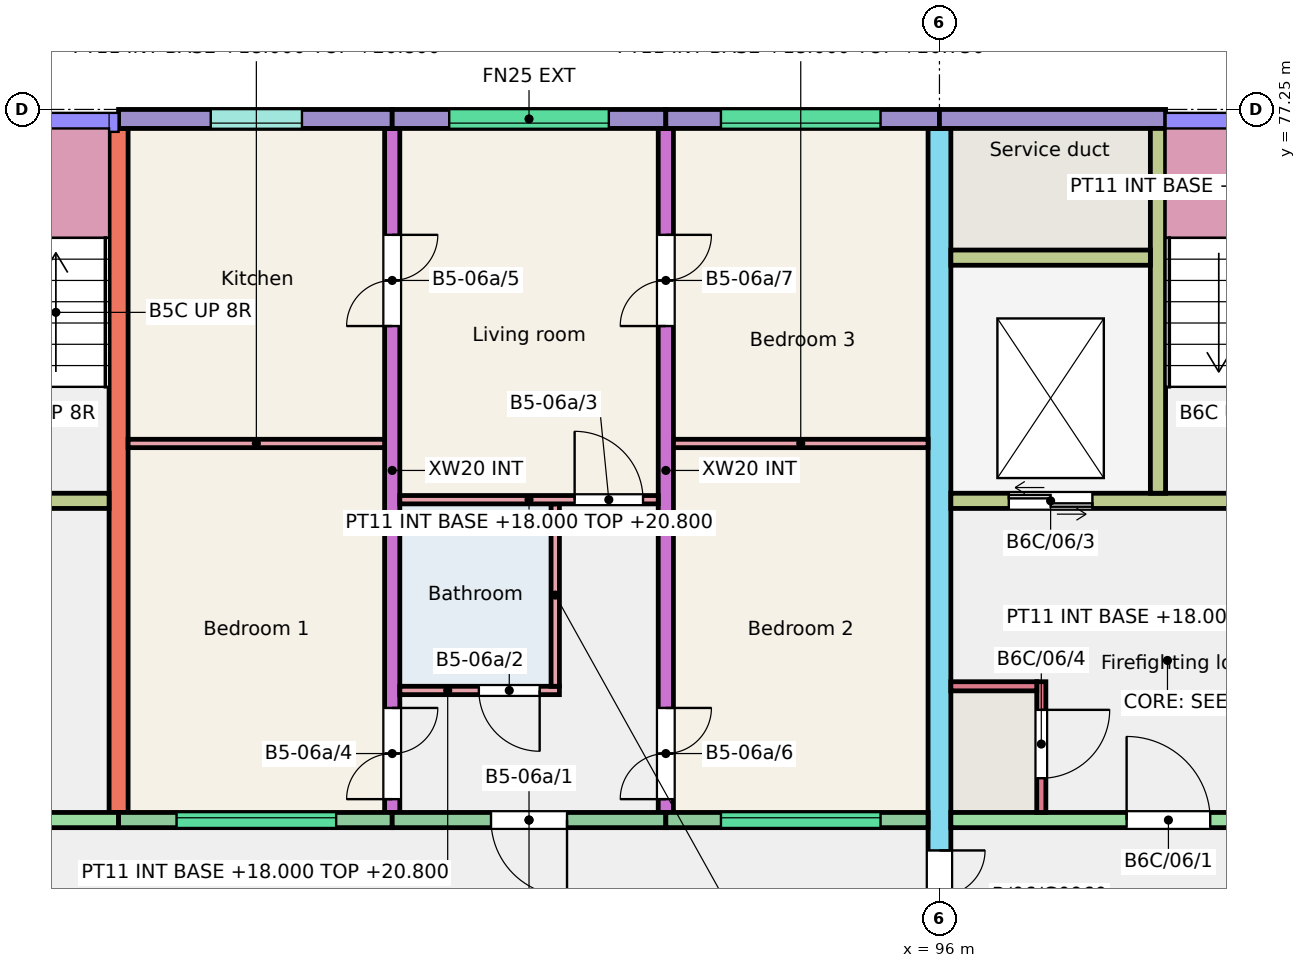
"""IFC4 building model, lengths in metres.
Left out: names, types, materials, properties, quantities, classifications, styles, units other than length and angle.
Written with IfcOpenShell. Run it as: python <this file> out.ifc"""

import sys

from ifc_helpers import new_model, si_unit, direction, frame, frame_2d, origin, place, context, subcontext, project, spatial, rectangle, extrude, element, fill, save


model = new_model("IFC4")
c1 = context("Model", 3, precision=1e-05, world=origin(), true_north=direction((0.0, 1.0)))
c2 = subcontext(c1, "Body", "Model", "MODEL_VIEW")
j1 = project(units=[si_unit("LENGTHUNIT", "METRE"), si_unit("PLANEANGLEUNIT", "RADIAN")], contexts=[c1])
p1 = place(None, origin())
s1 = spatial("IfcSite", under=j1, at=p1, CompositionType="ELEMENT")
p2 = place(p1, origin())
s2 = spatial("IfcBuilding", under=s1, at=p2, CompositionType="ELEMENT")
p3 = place(p2, frame((0.0, 0.0, 18.0)))
s3 = spatial("IfcBuildingStorey", under=s2, at=p3, CompositionType="ELEMENT", Elevation=18.0)
p4 = place(p3, frame((85.2, 68.0, 0.0), z_axis=(0.0, 0.0, 1.0), x_axis=(0.0, 1.0, 0.0)))
e1 = element("IfcWall", 1, at=p4, inside=s3, PredefinedType="SHEAR", context=c2, shape_type="SweptSolid", body=[
    extrude(rectangle(XDim=9.0, YDim=0.25, at=frame_2d((4.5, 0.0))), origin(), (0.0, 0.0, 1.0), 3.0),
])
p5 = place(p3, frame((88.8, 68.0, 0.0), z_axis=(0.0, 0.0, 1.0), x_axis=(0.0, 1.0, 0.0)))
e2 = element("IfcWall", 2, at=p5, inside=s3, PredefinedType="SHEAR", context=c2, shape_type="SweptSolid", body=[
    extrude(rectangle(XDim=9.0, YDim=0.2, at=frame_2d((4.5, 0.0))), origin(), (0.0, 0.0, 1.0), 3.0),
])
p6 = place(p5, frame((0.175, 0.0, 0.0)))
e3 = element("IfcOpeningElement", 3, at=p6, cuts=e2, PredefinedType="OPENING", context=c2, shape_type="SweptSolid", body=[
    extrude(rectangle(XDim=1.2, YDim=2.1, at=frame_2d((0.6, 1.05))), frame((0.0, 0.11, 0.0), z_axis=(0.0, -1.0, 0.0), x_axis=(1.0, 0.0, 0.0)), (0.0, 0.0, 1.0), 0.22),
])
p7 = place(p5, frame((6.4, 0.0, 0.0)))
e4 = element("IfcOpeningElement", 4, at=p7, cuts=e2, PredefinedType="OPENING", context=c2, shape_type="SweptSolid", body=[
    extrude(rectangle(XDim=1.2, YDim=2.1, at=frame_2d((0.6, 1.05))), frame((0.0, 0.11, 0.0), z_axis=(0.0, -1.0, 0.0), x_axis=(1.0, 0.0, 0.0)), (0.0, 0.0, 1.0), 0.22),
])
p8 = place(p3, frame((92.4, 68.0, 0.0), z_axis=(0.0, 0.0, 1.0), x_axis=(0.0, 1.0, 0.0)))
e5 = element("IfcWall", 5, at=p8, inside=s3, PredefinedType="SHEAR", context=c2, shape_type="SweptSolid", body=[
    extrude(rectangle(XDim=9.0, YDim=0.2, at=frame_2d((4.5, 0.0))), origin(), (0.0, 0.0, 1.0), 3.0),
])
p9 = place(p8, frame((0.175, 0.0, 0.0)))
e6 = element("IfcOpeningElement", 6, at=p9, cuts=e5, PredefinedType="OPENING", context=c2, shape_type="SweptSolid", body=[
    extrude(rectangle(XDim=1.2, YDim=2.1, at=frame_2d((0.6, 1.05))), frame((0.0, 0.11, 0.0), z_axis=(0.0, -1.0, 0.0), x_axis=(1.0, 0.0, 0.0)), (0.0, 0.0, 1.0), 0.22),
])
p10 = place(p8, frame((6.4, 0.0, 0.0)))
e7 = element("IfcOpeningElement", 7, at=p10, cuts=e5, PredefinedType="OPENING", context=c2, shape_type="SweptSolid", body=[
    extrude(rectangle(XDim=1.2, YDim=2.1, at=frame_2d((0.6, 1.05))), frame((0.0, 0.11, 0.0), z_axis=(0.0, -1.0, 0.0), x_axis=(1.0, 0.0, 0.0)), (0.0, 0.0, 1.0), 0.22),
])
p11 = place(p3, frame((96.0, 66.0, 0.0), z_axis=(0.0, 0.0, 1.0), x_axis=(0.0, 1.0, 0.0)))
e8 = element("IfcWall", 8, at=p11, inside=s3, PredefinedType="SHEAR", context=c2, shape_type="SweptSolid", body=[
    extrude(rectangle(XDim=11.0, YDim=0.3, at=frame_2d((5.5, 0.0))), origin(), (0.0, 0.0, 1.0), 3.0),
])
p12 = place(p11, frame((0.3, 0.0, 0.0)))
e9 = element("IfcOpeningElement", 9, at=p12, cuts=e8, PredefinedType="OPENING", context=c2, shape_type="SweptSolid", body=[
    extrude(rectangle(XDim=1.2, YDim=2.1, at=frame_2d((0.6, 1.05))), frame((0.0, 0.16, 0.0), z_axis=(0.0, -1.0, 0.0), x_axis=(1.0, 0.0, 0.0)), (0.0, 0.0, 1.0), 0.32),
])
p13 = place(p3, frame((79.35, 67.9, 0.0), z_axis=(0.0, 0.0, 1.0), x_axis=(1.0, 0.0, 0.0)))
e10 = element("IfcWall", 10, at=p13, inside=s3, PredefinedType="SHEAR", context=c2, shape_type="SweptSolid", body=[
    extrude(rectangle(XDim=5.85, YDim=0.2, at=frame_2d((2.925, 0.0))), origin(), (0.0, 0.0, 1.0), 3.0),
])
p14 = place(p13, frame((2.312, 0.0, 0.0)))
e11 = element("IfcOpeningElement", 11, at=p14, cuts=e10, PredefinedType="OPENING", context=c2, shape_type="SweptSolid", body=[
    extrude(rectangle(XDim=1.1, YDim=2.1, at=frame_2d((0.55, 1.05))), frame((0.0, 0.11, 0.0), z_axis=(0.0, -1.0, 0.0), x_axis=(1.0, 0.0, 0.0)), (0.0, 0.0, 1.0), 0.22),
])
p15 = place(p3, frame((79.35, 72.1, 0.0), z_axis=(0.0, 0.0, 1.0), x_axis=(1.0, 0.0, 0.0)))
e12 = element("IfcWall", 12, at=p15, inside=s3, PredefinedType="SHEAR", context=c2, shape_type="SweptSolid", body=[
    extrude(rectangle(XDim=5.725, YDim=0.2, at=frame_2d((2.862, 0.0))), origin(), (0.0, 0.0, 1.0), 3.0),
])
p16 = place(p15, frame((3.775, 0.0, 0.0)))
e13 = element("IfcOpeningElement", 13, at=p16, cuts=e12, PredefinedType="OPENING", context=c2, shape_type="SweptSolid", body=[
    extrude(rectangle(XDim=1.0, YDim=2.1, at=frame_2d((0.5, 1.05))), frame((0.0, 0.11, 0.0), z_axis=(0.0, -1.0, 0.0), x_axis=(1.0, 0.0, 0.0)), (0.0, 0.0, 1.0), 0.22),
])
p17 = place(p15, frame((0.762, 0.0, 0.0)))
e14 = element("IfcOpeningElement", 14, at=p17, cuts=e12, PredefinedType="OPENING", context=c2, shape_type="SweptSolid", body=[
    extrude(rectangle(XDim=1.1, YDim=2.1, at=frame_2d((0.55, 1.05))), frame((0.0, 0.11, 0.0), z_axis=(0.0, -1.0, 0.0), x_axis=(1.0, 0.0, 0.0)), (0.0, 0.0, 1.0), 0.22),
])
p18 = place(p3, frame((85.2, 77.125, 0.0), z_axis=(0.0, 0.0, 1.0), x_axis=(1.0, 0.0, 0.0)))
e15 = element("IfcWall", 15, at=p18, inside=s3, PredefinedType="SOLIDWALL", context=c2, shape_type="SweptSolid", body=[
    extrude(rectangle(XDim=3.6, YDim=0.25, at=frame_2d((1.8, 0.0))), origin(), (0.0, 0.0, 1.0), 3.0),
])
p19 = place(p18, frame((1.212, 0.0, 1.1)))
e16 = element("IfcOpeningElement", 16, at=p19, cuts=e15, PredefinedType="OPENING", context=c2, shape_type="SweptSolid", body=[
    extrude(rectangle(XDim=1.2, YDim=1.3, at=frame_2d((0.6, 0.65))), frame((0.0, 0.135, 0.0), z_axis=(0.0, -1.0, 0.0), x_axis=(1.0, 0.0, 0.0)), (0.0, 0.0, 1.0), 0.27),
])
p20 = place(p3, frame((85.2, 67.9, 0.0), z_axis=(0.0, 0.0, 1.0), x_axis=(1.0, 0.0, 0.0)))
e17 = element("IfcWall", 17, at=p20, inside=s3, PredefinedType="SOLIDWALL", context=c2, shape_type="SweptSolid", body=[
    extrude(rectangle(XDim=3.6, YDim=0.2, at=frame_2d((1.8, 0.0))), origin(), (0.0, 0.0, 1.0), 3.0),
])
p21 = place(p20, frame((0.762, 0.0, 1.2)))
e18 = element("IfcOpeningElement", 18, at=p21, cuts=e17, PredefinedType="OPENING", context=c2, shape_type="SweptSolid", body=[
    extrude(rectangle(XDim=2.1, YDim=1.2, at=frame_2d((1.05, 0.6))), frame((0.0, 0.11, 0.0), z_axis=(0.0, -1.0, 0.0), x_axis=(1.0, 0.0, 0.0)), (0.0, 0.0, 1.0), 0.22),
])
p22 = place(p3, frame((88.8, 77.125, 0.0), z_axis=(0.0, 0.0, 1.0), x_axis=(1.0, 0.0, 0.0)))
e19 = element("IfcWall", 19, at=p22, inside=s3, PredefinedType="SOLIDWALL", context=c2, shape_type="SweptSolid", body=[
    extrude(rectangle(XDim=3.6, YDim=0.25, at=frame_2d((1.8, 0.0))), origin(), (0.0, 0.0, 1.0), 3.0),
])
p23 = place(p22, frame((0.75, 0.0, 1.2)))
e20 = element("IfcOpeningElement", 20, at=p23, cuts=e19, PredefinedType="OPENING", context=c2, shape_type="SweptSolid", body=[
    extrude(rectangle(XDim=2.1, YDim=1.2, at=frame_2d((1.05, 0.6))), frame((0.0, 0.135, 0.0), z_axis=(0.0, -1.0, 0.0), x_axis=(1.0, 0.0, 0.0)), (0.0, 0.0, 1.0), 0.27),
])
p24 = place(p3, frame((88.8, 67.9, 0.0), z_axis=(0.0, 0.0, 1.0), x_axis=(1.0, 0.0, 0.0)))
e21 = element("IfcWall", 21, at=p24, inside=s3, PredefinedType="SOLIDWALL", context=c2, shape_type="SweptSolid", body=[
    extrude(rectangle(XDim=3.6, YDim=0.2, at=frame_2d((1.8, 0.0))), origin(), (0.0, 0.0, 1.0), 3.0),
])
p25 = place(p24, frame((1.3, 0.0, 0.0)))
e22 = element("IfcOpeningElement", 22, at=p25, cuts=e21, PredefinedType="OPENING", context=c2, shape_type="SweptSolid", body=[
    extrude(rectangle(XDim=1.0, YDim=2.1, at=frame_2d((0.5, 1.05))), frame((0.0, 0.11, 0.0), z_axis=(0.0, -1.0, 0.0), x_axis=(1.0, 0.0, 0.0)), (0.0, 0.0, 1.0), 0.22),
])
p26 = place(p3, frame((92.4, 77.125, 0.0), z_axis=(0.0, 0.0, 1.0), x_axis=(1.0, 0.0, 0.0)))
e23 = element("IfcWall", 23, at=p26, inside=s3, PredefinedType="SOLIDWALL", context=c2, shape_type="SweptSolid", body=[
    extrude(rectangle(XDim=3.6, YDim=0.25, at=frame_2d((1.8, 0.0))), origin(), (0.0, 0.0, 1.0), 3.0),
])
p27 = place(p26, frame((0.725, 0.0, 1.2)))
e24 = element("IfcOpeningElement", 24, at=p27, cuts=e23, PredefinedType="OPENING", context=c2, shape_type="SweptSolid", body=[
    extrude(rectangle(XDim=2.1, YDim=1.2, at=frame_2d((1.05, 0.6))), frame((0.0, 0.135, 0.0), z_axis=(0.0, -1.0, 0.0), x_axis=(1.0, 0.0, 0.0)), (0.0, 0.0, 1.0), 0.27),
])
p28 = place(p3, frame((92.4, 67.9, 0.0), z_axis=(0.0, 0.0, 1.0), x_axis=(1.0, 0.0, 0.0)))
e25 = element("IfcWall", 25, at=p28, inside=s3, PredefinedType="SOLIDWALL", context=c2, shape_type="SweptSolid", body=[
    extrude(rectangle(XDim=3.45, YDim=0.2, at=frame_2d((1.725, 0.0))), origin(), (0.0, 0.0, 1.0), 3.0),
])
p29 = place(p28, frame((0.725, 0.0, 1.2)))
e26 = element("IfcOpeningElement", 26, at=p29, cuts=e25, PredefinedType="OPENING", context=c2, shape_type="SweptSolid", body=[
    extrude(rectangle(XDim=2.1, YDim=1.2, at=frame_2d((1.05, 0.6))), frame((0.0, 0.11, 0.0), z_axis=(0.0, -1.0, 0.0), x_axis=(1.0, 0.0, 0.0)), (0.0, 0.0, 1.0), 0.22),
])
p30 = place(p3, frame((96.0, 77.125, 0.0), z_axis=(0.0, 0.0, 1.0), x_axis=(1.0, 0.0, 0.0)))
e27 = element("IfcWall", 27, at=p30, inside=s3, PredefinedType="SOLIDWALL", context=c2, shape_type="SweptSolid", body=[
    extrude(rectangle(XDim=2.975, YDim=0.25, at=frame_2d((1.488, 0.0))), origin(), (0.0, 0.0, 1.0), 3.0),
])
p31 = place(p3, frame((96.15, 67.9, 0.0), z_axis=(0.0, 0.0, 1.0), x_axis=(1.0, 0.0, 0.0)))
e28 = element("IfcWall", 28, at=p31, inside=s3, PredefinedType="SHEAR", context=c2, shape_type="SweptSolid", body=[
    extrude(rectangle(XDim=5.85, YDim=0.2, at=frame_2d((2.925, 0.0))), origin(), (0.0, 0.0, 1.0), 3.0),
])
p32 = place(p31, frame((2.312, 0.0, 0.0)))
e29 = element("IfcOpeningElement", 29, at=p32, cuts=e28, PredefinedType="OPENING", context=c2, shape_type="SweptSolid", body=[
    extrude(rectangle(XDim=1.1, YDim=2.1, at=frame_2d((0.55, 1.05))), frame((0.0, 0.11, 0.0), z_axis=(0.0, -1.0, 0.0), x_axis=(1.0, 0.0, 0.0)), (0.0, 0.0, 1.0), 0.22),
])
p33 = place(p3, frame((96.15, 72.1, 0.0), z_axis=(0.0, 0.0, 1.0), x_axis=(1.0, 0.0, 0.0)))
e30 = element("IfcWall", 30, at=p33, inside=s3, PredefinedType="SHEAR", context=c2, shape_type="SweptSolid", body=[
    extrude(rectangle(XDim=5.725, YDim=0.2, at=frame_2d((2.863, 0.0))), origin(), (0.0, 0.0, 1.0), 3.0),
])
p34 = place(p33, frame((3.775, 0.0, 0.0)))
e31 = element("IfcOpeningElement", 31, at=p34, cuts=e30, PredefinedType="OPENING", context=c2, shape_type="SweptSolid", body=[
    extrude(rectangle(XDim=1.0, YDim=2.1, at=frame_2d((0.5, 1.05))), frame((0.0, 0.11, 0.0), z_axis=(0.0, -1.0, 0.0), x_axis=(1.0, 0.0, 0.0)), (0.0, 0.0, 1.0), 0.22),
])
p35 = place(p33, frame((0.762, 0.0, 0.0)))
e32 = element("IfcOpeningElement", 32, at=p35, cuts=e30, PredefinedType="OPENING", context=c2, shape_type="SweptSolid", body=[
    extrude(rectangle(XDim=1.1, YDim=2.1, at=frame_2d((0.55, 1.05))), frame((0.0, 0.11, 0.0), z_axis=(0.0, -1.0, 0.0), x_axis=(1.0, 0.0, 0.0)), (0.0, 0.0, 1.0), 0.22),
])
p36 = place(p3, frame((98.875, 72.2, 0.0), z_axis=(0.0, 0.0, 1.0), x_axis=(0.0, 1.0, 0.0)))
e33 = element("IfcWall", 33, at=p36, inside=s3, PredefinedType="SHEAR", context=c2, shape_type="SweptSolid", body=[
    extrude(rectangle(XDim=4.8, YDim=0.2, at=frame_2d((2.4, 0.0))), origin(), (0.0, 0.0, 1.0), 3.0),
])
p37 = place(p3, frame((96.15, 75.3, 0.0), z_axis=(0.0, 0.0, 1.0), x_axis=(1.0, 0.0, 0.0)))
e34 = element("IfcWall", 34, at=p37, inside=s3, PredefinedType="SHEAR", context=c2, shape_type="SweptSolid", body=[
    extrude(rectangle(XDim=2.625, YDim=0.2, at=frame_2d((1.312, 0.0))), origin(), (0.0, 0.0, 1.0), 3.0),
])
p38 = place(p3, frame((97.34, 68.0, 0.0), z_axis=(0.0, 0.0, 1.0), x_axis=(0.0, 1.0, 0.0)))
e35 = element("IfcWall", 35, at=p38, inside=s3, PredefinedType="SHEAR", context=c2, shape_type="SweptSolid", body=[
    extrude(rectangle(XDim=1.72, YDim=0.12, at=frame_2d((0.86, 0.0))), origin(), (0.0, 0.0, 1.0), 3.0),
])
p39 = place(p38, frame((0.45, 0.0, 0.0)))
e36 = element("IfcOpeningElement", 36, at=p39, cuts=e35, PredefinedType="OPENING", context=c2, shape_type="SweptSolid", body=[
    extrude(rectangle(XDim=0.9, YDim=2.1, at=frame_2d((0.45, 1.05))), frame((0.0, 0.07, 0.0), z_axis=(0.0, -1.0, 0.0), x_axis=(1.0, 0.0, 0.0)), (0.0, 0.0, 1.0), 0.14),
])
p40 = place(p3, frame((96.15, 69.66, 0.0), z_axis=(0.0, 0.0, 1.0), x_axis=(1.0, 0.0, 0.0)))
e37 = element("IfcWall", 37, at=p40, inside=s3, PredefinedType="SHEAR", context=c2, shape_type="SweptSolid", body=[
    extrude(rectangle(XDim=1.13, YDim=0.12, at=frame_2d((0.565, 0.0))), origin(), (0.0, 0.0, 1.0), 3.0),
])
p41 = place(p3, frame((88.9, 69.605, 0.0), z_axis=(0.0, 0.0, 1.0), x_axis=(1.0, 0.0, 0.0)))
e38 = element("IfcWall", 38, at=p41, inside=s3, PredefinedType="PARTITIONING", context=c2, shape_type="SweptSolid", body=[
    extrude(rectangle(XDim=2.1, YDim=0.11, at=frame_2d((1.05, 0.0))), origin(), (0.0, 0.0, 1.0), 2.8),
])
p42 = place(p41, frame((1.04, 0.0, 0.0)))
e39 = element("IfcOpeningElement", 39, at=p42, cuts=e38, PredefinedType="OPENING", context=c2, shape_type="SweptSolid", body=[
    extrude(rectangle(XDim=0.8, YDim=2.1, at=frame_2d((0.4, 1.05))), frame((0.0, 0.065, 0.0), z_axis=(0.0, -1.0, 0.0), x_axis=(1.0, 0.0, 0.0)), (0.0, 0.0, 1.0), 0.13),
])
p43 = place(p3, frame((90.945, 69.66, 0.0), z_axis=(0.0, 0.0, 1.0), x_axis=(0.0, 1.0, 0.0)))
e40 = element("IfcWall", 40, at=p43, inside=s3, PredefinedType="PARTITIONING", context=c2, shape_type="SweptSolid", body=[
    extrude(rectangle(XDim=2.4, YDim=0.11, at=frame_2d((1.2, 0.0))), origin(), (0.0, 0.0, 1.0), 2.8),
])
p44 = place(p3, frame((88.9, 72.115, 0.0), z_axis=(0.0, 0.0, 1.0), x_axis=(1.0, 0.0, 0.0)))
e41 = element("IfcWall", 41, at=p44, inside=s3, PredefinedType="PARTITIONING", context=c2, shape_type="SweptSolid", body=[
    extrude(rectangle(XDim=3.4, YDim=0.11, at=frame_2d((1.7, 0.0))), origin(), (0.0, 0.0, 1.0), 2.8),
])
p45 = place(p44, frame((2.3, 0.0, 0.0)))
e42 = element("IfcOpeningElement", 42, at=p45, cuts=e41, PredefinedType="OPENING", context=c2, shape_type="SweptSolid", body=[
    extrude(rectangle(XDim=0.9, YDim=2.1, at=frame_2d((0.45, 1.05))), frame((0.0, 0.065, 0.0), z_axis=(0.0, -1.0, 0.0), x_axis=(1.0, 0.0, 0.0)), (0.0, 0.0, 1.0), 0.13),
])
p46 = place(p3, frame((85.325, 72.855, 0.0), z_axis=(0.0, 0.0, 1.0), x_axis=(1.0, 0.0, 0.0)))
e43 = element("IfcWall", 43, at=p46, inside=s3, PredefinedType="PARTITIONING", context=c2, shape_type="SweptSolid", body=[
    extrude(rectangle(XDim=3.375, YDim=0.11, at=frame_2d((1.688, 0.0))), origin(), (0.0, 0.0, 1.0), 2.8),
])
p47 = place(p3, frame((92.5, 72.855, 0.0), z_axis=(0.0, 0.0, 1.0), x_axis=(1.0, 0.0, 0.0)))
e44 = element("IfcWall", 44, at=p47, inside=s3, PredefinedType="PARTITIONING", context=c2, shape_type="SweptSolid", body=[
    extrude(rectangle(XDim=3.35, YDim=0.11, at=frame_2d((1.675, 0.0))), origin(), (0.0, 0.0, 1.0), 2.75),
])
p48 = place(p21, origin())
e45 = element("IfcWindow", 45, at=p48, inside=s3, PartitioningType="SINGLE_PANEL", PredefinedType="WINDOW", context=c2, shape_type="SweptSolid", body=[
    extrude(rectangle(XDim=2.1, YDim=1.2, at=frame_2d((1.05, 0.6))), frame((0.0, 0.06, 0.0), z_axis=(0.0, -1.0, 0.0), x_axis=(1.0, 0.0, 0.0)), (0.0, 0.0, 1.0), 0.06),
])
fill(e18, e45)
p49 = place(p19, origin())
e46 = element("IfcWindow", 46, at=p49, inside=s3, PartitioningType="SINGLE_PANEL", PredefinedType="WINDOW", context=c2, shape_type="SweptSolid", body=[
    extrude(rectangle(XDim=1.2, YDim=1.3, at=frame_2d((0.6, 0.65))), frame((0.0, -0.025, 0.0), z_axis=(0.0, -1.0, 0.0), x_axis=(1.0, 0.0, 0.0)), (0.0, 0.0, 1.0), 0.06),
])
fill(e16, e46)
p50 = place(p29, origin())
e47 = element("IfcWindow", 47, at=p50, inside=s3, PartitioningType="SINGLE_PANEL", PredefinedType="WINDOW", context=c2, shape_type="SweptSolid", body=[
    extrude(rectangle(XDim=2.1, YDim=1.2, at=frame_2d((1.05, 0.6))), frame((0.0, 0.06, 0.0), z_axis=(0.0, -1.0, 0.0), x_axis=(1.0, 0.0, 0.0)), (0.0, 0.0, 1.0), 0.06),
])
fill(e26, e47)
p51 = place(p27, origin())
e48 = element("IfcWindow", 48, at=p51, inside=s3, PartitioningType="SINGLE_PANEL", PredefinedType="WINDOW", context=c2, shape_type="SweptSolid", body=[
    extrude(rectangle(XDim=2.1, YDim=1.2, at=frame_2d((1.05, 0.6))), frame((0.0, -0.025, 0.0), z_axis=(0.0, -1.0, 0.0), x_axis=(1.0, 0.0, 0.0)), (0.0, 0.0, 1.0), 0.06),
])
fill(e24, e48)
p52 = place(p23, origin())
e49 = element("IfcWindow", 49, at=p52, inside=s3, PartitioningType="SINGLE_PANEL", PredefinedType="WINDOW", context=c2, shape_type="SweptSolid", body=[
    extrude(rectangle(XDim=2.1, YDim=1.2, at=frame_2d((1.05, 0.6))), frame((0.0, -0.025, 0.0), z_axis=(0.0, -1.0, 0.0), x_axis=(1.0, 0.0, 0.0)), (0.0, 0.0, 1.0), 0.06),
])
fill(e20, e49)
p53 = place(p25, origin())
e50 = element("IfcDoor", 50, at=p53, inside=s3, OperationType="SINGLE_SWING_RIGHT", PredefinedType="DOOR", context=c2, shape_type="SweptSolid", body=[
    extrude(rectangle(XDim=1.0, YDim=2.1, at=frame_2d((0.5, 1.05))), frame((0.0, 0.025, 0.0), z_axis=(0.0, -1.0, 0.0), x_axis=(1.0, 0.0, 0.0)), (0.0, 0.0, 1.0), 0.05),
])
fill(e22, e50)
p54 = place(p42, origin())
e51 = element("IfcDoor", 51, at=p54, inside=s3, OperationType="SINGLE_SWING_RIGHT", PredefinedType="DOOR", context=c2, shape_type="SweptSolid", body=[
    extrude(rectangle(XDim=0.8, YDim=2.1, at=frame_2d((0.4, 1.05))), frame((0.0, 0.025, 0.0), z_axis=(0.0, -1.0, 0.0), x_axis=(1.0, 0.0, 0.0)), (0.0, 0.0, 1.0), 0.05),
])
fill(e39, e51)
p55 = place(p45, origin())
e52 = element("IfcDoor", 52, at=p55, inside=s3, OperationType="SINGLE_SWING_LEFT", PredefinedType="DOOR", context=c2, shape_type="SweptSolid", body=[
    extrude(rectangle(XDim=0.9, YDim=2.1, at=frame_2d((0.45, 1.05))), frame((0.0, 0.025, 0.0), z_axis=(0.0, -1.0, 0.0), x_axis=(1.0, 0.0, 0.0)), (0.0, 0.0, 1.0), 0.05),
])
fill(e42, e52)
p56 = place(p6, origin())
e53 = element("IfcDoor", 53, at=p56, inside=s3, OperationType="DOUBLE_DOOR_SINGLE_SWING", PredefinedType="DOOR", context=c2, shape_type="SweptSolid", body=[
    extrude(rectangle(XDim=1.2, YDim=2.1, at=frame_2d((0.6, 1.05))), frame((0.0, 0.025, 0.0), z_axis=(0.0, -1.0, 0.0), x_axis=(1.0, 0.0, 0.0)), (0.0, 0.0, 1.0), 0.05),
])
fill(e3, e53)
p57 = place(p7, origin())
e54 = element("IfcDoor", 54, at=p57, inside=s3, OperationType="DOUBLE_DOOR_SINGLE_SWING", PredefinedType="DOOR", context=c2, shape_type="SweptSolid", body=[
    extrude(rectangle(XDim=1.2, YDim=2.1, at=frame_2d((0.6, 1.05))), frame((0.0, 0.025, 0.0), z_axis=(0.0, -1.0, 0.0), x_axis=(1.0, 0.0, 0.0)), (0.0, 0.0, 1.0), 0.05),
])
fill(e4, e54)
p58 = place(p9, origin())
e55 = element("IfcDoor", 55, at=p58, inside=s3, OperationType="DOUBLE_DOOR_SINGLE_SWING", PredefinedType="DOOR", context=c2, shape_type="SweptSolid", body=[
    extrude(rectangle(XDim=1.2, YDim=2.1, at=frame_2d((0.6, 1.05))), frame((0.0, 0.025, 0.0), z_axis=(0.0, -1.0, 0.0), x_axis=(1.0, 0.0, 0.0)), (0.0, 0.0, 1.0), 0.05),
])
fill(e6, e55)
p59 = place(p10, origin())
e56 = element("IfcDoor", 56, at=p59, inside=s3, OperationType="DOUBLE_DOOR_SINGLE_SWING", PredefinedType="DOOR", context=c2, shape_type="SweptSolid", body=[
    extrude(rectangle(XDim=1.2, YDim=2.1, at=frame_2d((0.6, 1.05))), frame((0.0, 0.025, 0.0), z_axis=(0.0, -1.0, 0.0), x_axis=(1.0, 0.0, 0.0)), (0.0, 0.0, 1.0), 0.05),
])
fill(e7, e56)
p60 = place(p32, origin())
e57 = element("IfcDoor", 57, at=p60, inside=s3, OperationType="SINGLE_SWING_LEFT", PredefinedType="DOOR", context=c2, shape_type="SweptSolid", body=[
    extrude(rectangle(XDim=1.1, YDim=2.1, at=frame_2d((0.55, 1.05))), frame((0.0, 0.025, 0.0), z_axis=(0.0, -1.0, 0.0), x_axis=(1.0, 0.0, 0.0)), (0.0, 0.0, 1.0), 0.05),
])
fill(e29, e57)
p61 = place(p35, origin())
e58 = element("IfcDoor", 58, at=p61, inside=s3, OperationType="DOUBLE_DOOR_SLIDING", PredefinedType="DOOR", context=c2, shape_type="SweptSolid", body=[
    extrude(rectangle(XDim=1.1, YDim=2.1, at=frame_2d((0.55, 1.05))), frame((0.0, 0.025, 0.0), z_axis=(0.0, -1.0, 0.0), x_axis=(1.0, 0.0, 0.0)), (0.0, 0.0, 1.0), 0.05),
])
fill(e32, e58)
p62 = place(p39, origin())
e59 = element("IfcDoor", 59, at=p62, inside=s3, OperationType="SINGLE_SWING_RIGHT", PredefinedType="DOOR", context=c2, shape_type="SweptSolid", body=[
    extrude(rectangle(XDim=0.9, YDim=2.1, at=frame_2d((0.45, 1.05))), frame((0.0, 0.025, 0.0), z_axis=(0.0, -1.0, 0.0), x_axis=(1.0, 0.0, 0.0)), (0.0, 0.0, 1.0), 0.05),
])
fill(e36, e59)
p63 = place(p12, origin())
e60 = element("IfcDoor", 60, at=p63, inside=s3, OperationType="DOUBLE_DOOR_SINGLE_SWING", PredefinedType="DOOR", context=c2, shape_type="SweptSolid", body=[
    extrude(rectangle(XDim=1.2, YDim=2.1, at=frame_2d((0.6, 1.05))), frame((0.0, 0.025, 0.0), z_axis=(0.0, -1.0, 0.0), x_axis=(1.0, 0.0, 0.0)), (0.0, 0.0, 1.0), 0.05),
])
fill(e9, e60)
save(model, sys.argv[1])
